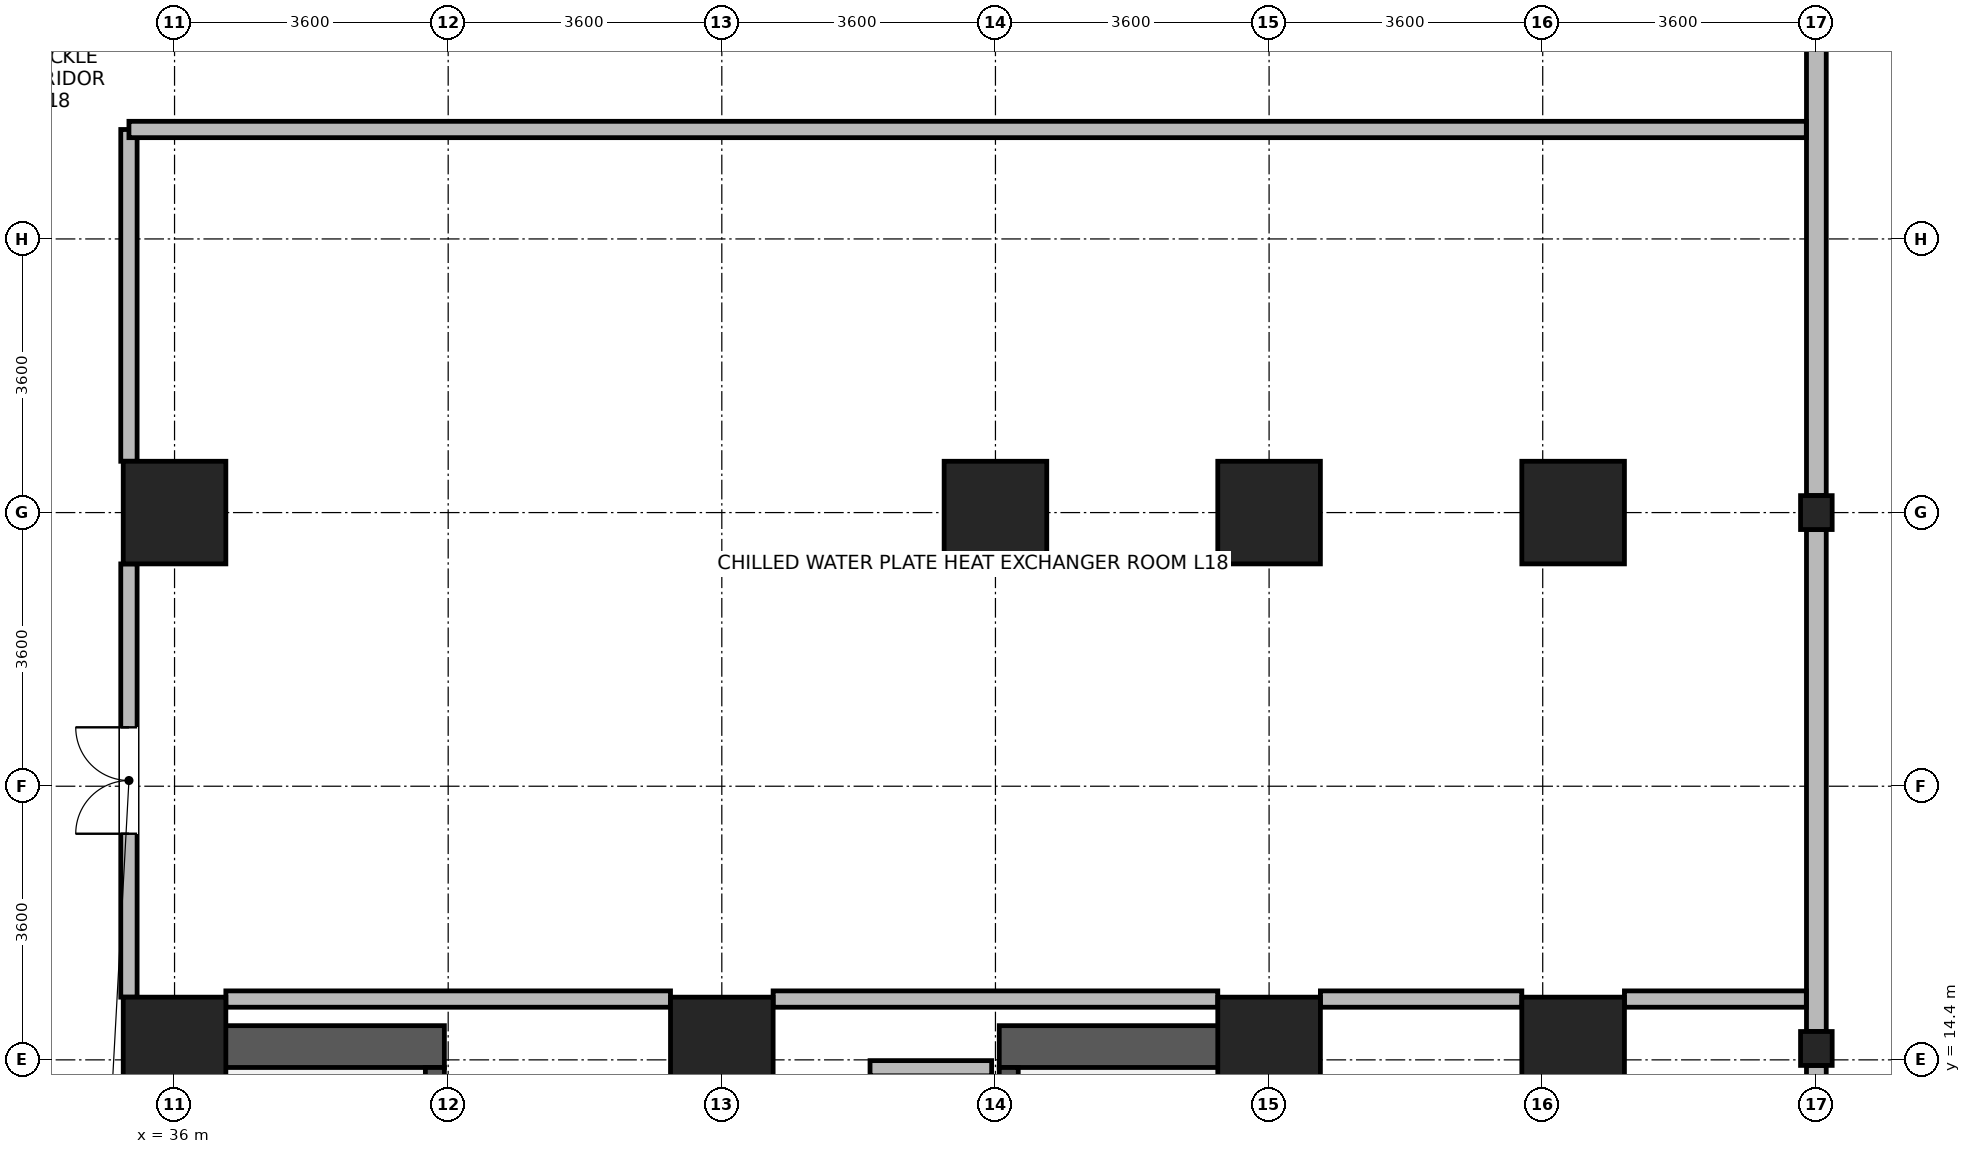
"""IFC4 building model, lengths in metres.
Left out: names, types, materials, properties, quantities, classifications, styles, units other than length and angle.
Written with IfcOpenShell. Run it as: python <this file> out.ifc"""

import sys

from ifc_helpers import new_model, si_unit, direction, frame, frame_2d, origin, origin_2d, place, context, subcontext, project, spatial, rectangle, i_section, extrude, source, transform, mapped, element, fill, save


model = new_model("IFC4")
c1 = context("Model", 3, precision=1e-05, world=origin(), true_north=direction((0.0, 1.0)))
c2 = subcontext(c1, "Body", "Model", "MODEL_VIEW")
j1 = project(units=[si_unit("LENGTHUNIT", "METRE"), si_unit("PLANEANGLEUNIT", "RADIAN")], contexts=[c1])
p1 = place(None, origin())
s1 = spatial("IfcSite", under=j1, at=p1, CompositionType="ELEMENT")
p2 = place(p1, origin())
s2 = spatial("IfcBuilding", under=s1, at=p2, CompositionType="ELEMENT")
p3 = place(p2, frame((0.0, 0.0, 73.4)))
s3 = spatial("IfcBuildingStorey", under=s2, at=p3, CompositionType="ELEMENT", Elevation=73.4)
for number, where, z_axis, x_axis in (
    (1, (36.075, 6.75, 0.0), (0.0, 0.0, 1.0), (0.0, 1.0, 0.0)),
    (2, (50.325, 6.75, 0.0), (0.0, 0.0, 1.0), (0.0, 1.0, 0.0)),
):
    element("IfcWall", number, at=place(p3, frame(where, z_axis=z_axis, x_axis=x_axis)), inside=s3, PredefinedType="SHEAR", context=c2, shape_type="SweptSolid", body=[
        extrude(rectangle(XDim=8.1, YDim=0.55, at=frame_2d((4.05, 0.0))), origin(), (0.0, 0.0, 1.0), 4.78),
    ])
for number, where, z_axis, x_axis in (
    (3, (36.35, 14.575, 0.0), (0.0, 0.0, 1.0), (1.0, 0.0, 0.0)),
    (4, (46.85, 14.575, 0.0), (0.0, 0.0, 1.0), (1.0, 0.0, 0.0)),
):
    element("IfcWall", number, at=place(p3, frame(where, z_axis=z_axis, x_axis=x_axis)), inside=s3, PredefinedType="SHEAR", context=c2, shape_type="SweptSolid", body=[
        extrude(rectangle(XDim=3.2, YDim=0.55, at=frame_2d((1.6, 0.0))), origin(), (0.0, 0.0, 1.0), 4.78),
    ])
p4 = place(p3, frame((39.425, 7.3, 0.0), z_axis=(0.0, 0.0, 1.0), x_axis=(0.0, 1.0, 0.0)))
e5 = element("IfcWall", 5, at=p4, inside=s3, PredefinedType="SHEAR", context=c2, shape_type="SweptSolid", body=[
    extrude(rectangle(XDim=7.0, YDim=0.25, at=frame_2d((3.5, 0.0))), origin(), (0.0, 0.0, 1.0), 4.78),
])
p5 = place(p4, frame((0.15, 0.0, 0.0)))
e6 = element("IfcOpeningElement", 6, at=p5, cuts=e5, PredefinedType="OPENING", context=c2, shape_type="SweptSolid", body=[
    extrude(rectangle(XDim=1.1, YDim=2.08, at=frame_2d((0.55, 1.04))), frame((0.0, 0.135, 0.0), z_axis=(0.0, -1.0, 0.0), x_axis=(1.0, 0.0, 0.0)), (0.0, 0.0, 1.0), 0.27),
])
p6 = place(p3, frame((46.975, 7.3, 0.0), z_axis=(0.0, 0.0, 1.0), x_axis=(0.0, 1.0, 0.0)))
e7 = element("IfcWall", 7, at=p6, inside=s3, PredefinedType="SHEAR", context=c2, shape_type="SweptSolid", body=[
    extrude(rectangle(XDim=7.0, YDim=0.25, at=frame_2d((3.5, 0.0))), origin(), (0.0, 0.0, 1.0), 4.78),
])
p7 = place(p6, frame((0.15, 0.0, 0.0)))
e8 = element("IfcOpeningElement", 8, at=p7, cuts=e7, PredefinedType="OPENING", context=c2, shape_type="SweptSolid", body=[
    extrude(rectangle(XDim=1.1, YDim=2.08, at=frame_2d((0.55, 1.04))), frame((0.0, 0.135, 0.0), z_axis=(0.0, -1.0, 0.0), x_axis=(1.0, 0.0, 0.0)), (0.0, 0.0, 1.0), 0.27),
])
m1 = source(origin(), c2, "Body", "SweptSolid", [
    extrude(rectangle(XDim=1.35, YDim=1.35, at=origin_2d()), origin(), (0.0, 0.0, 1.0), 5.2),
])
for number, where, z_axis, x_axis in (
    (9, (36.0, 21.6, 0.0), (0.0, 0.0, 1.0), (1.0, 0.0, 0.0)),
    (10, (46.8, 21.6, 0.0), (0.0, 0.0, 1.0), (1.0, 0.0, 0.0)),
    (11, (36.0, 14.55, 0.0), (0.0, 0.0, 1.0), (1.0, 0.0, 0.0)),
    (12, (43.2, 14.55, 0.0), (0.0, 0.0, 1.0), (1.0, 0.0, 0.0)),
    (13, (50.4, 14.55, 0.0), (0.0, 0.0, 1.0), (1.0, 0.0, 0.0)),
    (14, (50.4, 21.6, 0.0), (0.0, 0.0, 1.0), (1.0, 0.0, 0.0)),
    (15, (54.4, 14.55, 0.0), (0.0, 0.0, 1.0), (1.0, 0.0, 0.0)),
    (16, (54.4, 21.6, 0.0), (0.0, 0.0, 1.0), (1.0, 0.0, 0.0)),
):
    element("IfcColumn", number, at=place(p3, frame(where, z_axis=z_axis, x_axis=x_axis)), inside=s3, PredefinedType="COLUMN", context=c2, shape_type="MappedRepresentation", body=[
        mapped(m1, transform((0.0, 0.0, 0.0), x_axis=(1.0, 0.0, 0.0), y_axis=(0.0, 1.0, 0.0), z_axis=(0.0, 0.0, 1.0), scale=1.0)),
    ])
m2 = source(origin(), c2, "Body", "SweptSolid", [
    extrude(i_section(OverallWidth=0.416, OverallDepth=0.446, WebThickness=0.029, FlangeThickness=0.04, FilletRadius=0.015, at=origin_2d()), origin(), (0.0, 0.0, 1.0), 5.2),
])
for number, where, z_axis, x_axis in (
    (17, (57.6, 14.55, 0.0), (0.0, 0.0, 1.0), (1.0, 0.0, 0.0)),
    (18, (57.6, 21.6, 0.0), (0.0, 0.0, 1.0), (1.0, 0.0, 0.0)),
):
    element("IfcColumn", number, at=place(p3, frame(where, z_axis=z_axis, x_axis=x_axis)), inside=s3, PredefinedType="COLUMN", context=c2, shape_type="MappedRepresentation", body=[
        mapped(m2, transform((0.0, 0.0, 0.0), x_axis=(1.0, 0.0, 0.0), y_axis=(0.0, 1.0, 0.0), z_axis=(0.0, 0.0, 1.0), scale=1.0)),
    ])
p8 = place(p3, frame((57.6, 14.326, 0.0), z_axis=(0.0, 0.0, 1.0), x_axis=(0.0, -1.0, 0.0)))
e19 = element("IfcWall", 19, at=p8, inside=s3, PredefinedType="STANDARD", context=c2, shape_type="SweptSolid", body=[
    extrude(rectangle(XDim=7.052, YDim=0.26, at=frame_2d((3.526, 0.0))), origin(), (0.0, 0.0, 1.0), 4.76),
])
for number, where, z_axis, x_axis in (
    (20, (57.6, 21.376, 0.0), (0.0, 0.0, 1.0), (0.0, -1.0, 0.0)),
    (21, (57.6, 28.426, 0.0), (0.0, 0.0, 1.0), (0.0, -1.0, 0.0)),
):
    element("IfcWall", number, at=place(p3, frame(where, z_axis=z_axis, x_axis=x_axis)), inside=s3, PredefinedType="STANDARD", context=c2, shape_type="SweptSolid", body=[
        extrude(rectangle(XDim=6.602, YDim=0.26, at=frame_2d((3.301, 0.0))), origin(), (0.0, 0.0, 1.0), 4.76),
    ])
p9 = place(p3, frame((45.15, 14.29, 0.0), z_axis=(0.0, 0.0, 1.0), x_axis=(1.0, 0.0, 0.0)))
e22 = element("IfcWall", 22, at=p9, inside=s3, PredefinedType="PARTITIONING", context=c2, shape_type="SweptSolid", body=[
    extrude(rectangle(XDim=1.6, YDim=0.2, at=frame_2d((0.8, 0.0))), origin(), (0.0, 0.0, 1.0), 3.56),
])
p10 = place(p3, frame((35.4, 15.225, 0.0), z_axis=(0.0, 0.0, 1.0), x_axis=(0.0, 1.0, 0.0)))
e23 = element("IfcWall", 23, at=p10, inside=s3, PredefinedType="PARTITIONING", context=c2, shape_type="SweptSolid", body=[
    extrude(rectangle(XDim=5.7, YDim=0.215, at=frame_2d((2.85, 0.0))), origin(), (0.0, 0.0, 1.0), 4.76),
])
p11 = place(p10, frame((2.15, 0.0, 0.0)))
e24 = element("IfcOpeningElement", 24, at=p11, cuts=e23, PredefinedType="OPENING", context=c2, shape_type="SweptSolid", body=[
    extrude(rectangle(XDim=1.4, YDim=2.15, at=frame_2d((0.7, 1.075))), frame((0.0, 0.118, 0.0), z_axis=(0.0, -1.0, 0.0), x_axis=(1.0, 0.0, 0.0)), (0.0, 0.0, 1.0), 0.235),
])
p12 = place(p3, frame((35.4, 22.275, 0.0), z_axis=(0.0, 0.0, 1.0), x_axis=(0.0, 1.0, 0.0)))
e25 = element("IfcWall", 25, at=p12, inside=s3, PredefinedType="PARTITIONING", context=c2, shape_type="SweptSolid", body=[
    extrude(rectangle(XDim=4.365, YDim=0.215, at=frame_2d((2.183, 0.0))), origin(), (0.0, 0.0, 1.0), 4.76),
])
p13 = place(p3, frame((36.675, 15.2, 0.0), z_axis=(0.0, 0.0, 1.0), x_axis=(1.0, 0.0, 0.0)))
e26 = element("IfcWall", 26, at=p13, inside=s3, PredefinedType="PARTITIONING", context=c2, shape_type="SweptSolid", body=[
    extrude(rectangle(XDim=5.85, YDim=0.215, at=frame_2d((2.925, 0.0))), origin(), (0.0, 0.0, 1.0), 4.76),
])
p14 = place(p3, frame((43.875, 15.2, 0.0), z_axis=(0.0, 0.0, 1.0), x_axis=(1.0, 0.0, 0.0)))
e27 = element("IfcWall", 27, at=p14, inside=s3, PredefinedType="PARTITIONING", context=c2, shape_type="SweptSolid", body=[
    extrude(rectangle(XDim=5.85, YDim=0.215, at=frame_2d((2.925, 0.0))), origin(), (0.0, 0.0, 1.0), 4.76),
])
p15 = place(p3, frame((51.075, 15.2, 0.0), z_axis=(0.0, 0.0, 1.0), x_axis=(1.0, 0.0, 0.0)))
e28 = element("IfcWall", 28, at=p15, inside=s3, PredefinedType="PARTITIONING", context=c2, shape_type="SweptSolid", body=[
    extrude(rectangle(XDim=2.65, YDim=0.215, at=frame_2d((1.325, 0.0))), origin(), (0.0, 0.0, 1.0), 4.76),
])
p16 = place(p3, frame((55.075, 15.2, 0.0), z_axis=(0.0, 0.0, 1.0), x_axis=(1.0, 0.0, 0.0)))
e29 = element("IfcWall", 29, at=p16, inside=s3, PredefinedType="PARTITIONING", context=c2, shape_type="SweptSolid", body=[
    extrude(rectangle(XDim=2.393, YDim=0.215, at=frame_2d((1.197, 0.0))), origin(), (0.0, 0.0, 1.0), 4.76),
])
p17 = place(p3, frame((35.4, 26.64, 0.0), z_axis=(0.0, 0.0, 1.0), x_axis=(1.0, 0.0, 0.0)))
e30 = element("IfcWall", 30, at=p17, inside=s3, PredefinedType="PARTITIONING", context=c2, shape_type="SweptSolid", body=[
    extrude(rectangle(XDim=22.068, YDim=0.215, at=frame_2d((11.034, 0.0))), origin(), (0.0, 0.0, 1.0), 4.76),
])
p18 = place(p11, origin())
e31 = element("IfcDoor", 31, at=p18, inside=s3, OperationType="DOUBLE_DOOR_SINGLE_SWING", PredefinedType="DOOR", context=c2, shape_type="SweptSolid", body=[
    extrude(rectangle(XDim=1.4, YDim=2.15, at=frame_2d((0.7, 1.075))), frame((0.0, 0.025, 0.0), z_axis=(0.0, -1.0, 0.0), x_axis=(1.0, 0.0, 0.0)), (0.0, 0.0, 1.0), 0.05),
])
fill(e24, e31)
save(model, sys.argv[1])
